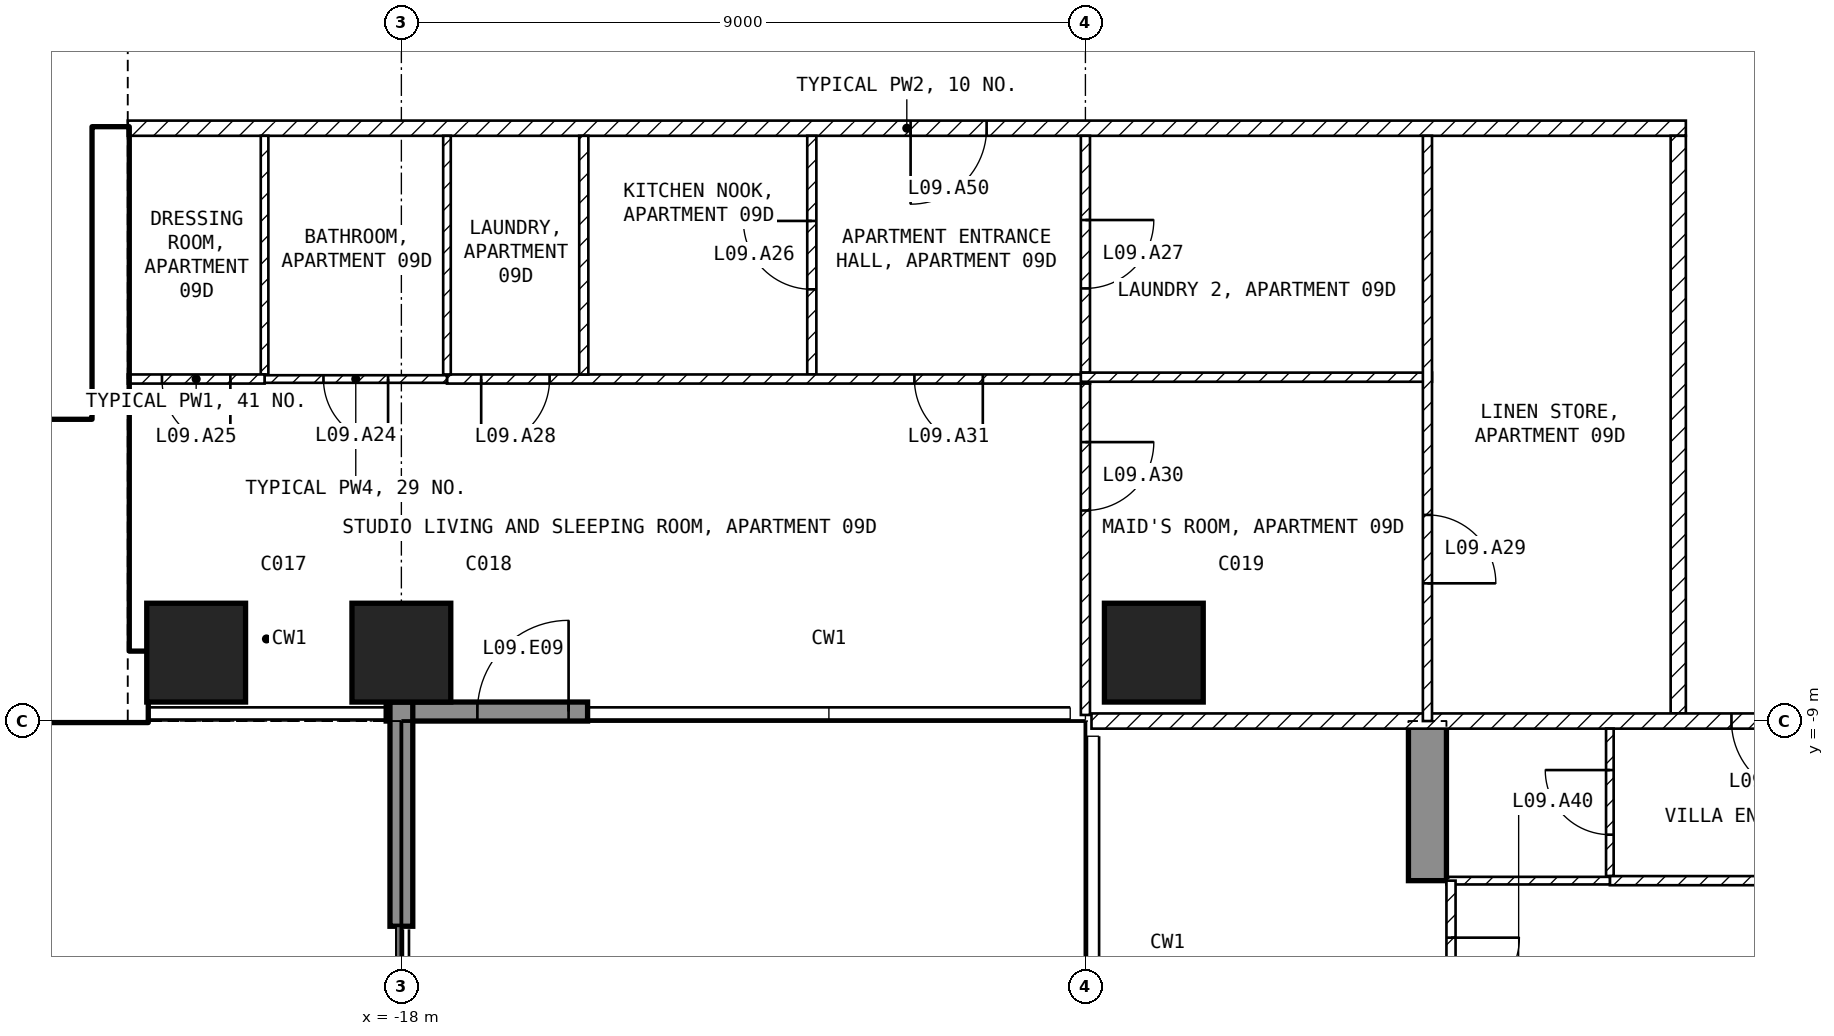
"""IFC4 building model, lengths in metres.
Left out: names, types, materials, properties, quantities, classifications, styles, units other than length and angle.
Written with IfcOpenShell. Run it as: python <this file> out.ifc"""

import sys

from ifc_helpers import new_model, si_unit, direction, frame, frame_2d, origin, origin_2d, place, context, subcontext, project, spatial, polyline, rectangle, outline, extrude, element, fill, save


model = new_model("IFC4")
c1 = context("Model", 3, precision=1e-05, world=origin(), true_north=direction((0.0, 1.0)))
c2 = subcontext(c1, "Body", "Model", "MODEL_VIEW")
j1 = project(units=[si_unit("LENGTHUNIT", "METRE"), si_unit("PLANEANGLEUNIT", "RADIAN")], contexts=[c1])
p1 = place(None, origin())
s1 = spatial("IfcSite", under=j1, at=p1, CompositionType="ELEMENT")
p2 = place(p1, origin())
s2 = spatial("IfcBuilding", under=s1, at=p2, CompositionType="ELEMENT")
p3 = place(p2, frame((0.0, 0.0, 50.5)))
s3 = spatial("IfcBuildingStorey", under=s2, at=p3, CompositionType="ELEMENT", Elevation=50.5)
for number, where, z_axis, x_axis in (
    (1, (-20.7, -8.1, -0.25), (0.0, 0.0, 1.0), (1.0, 0.0, 0.0)),
    (2, (-18.0, -8.1, -0.25), (0.0, 0.0, 1.0), (1.0, 0.0, 0.0)),
    (3, (-8.1, -8.1, -0.25), (0.0, 0.0, 1.0), (1.0, 0.0, 0.0)),
):
    element("IfcColumn", number, at=place(p3, frame(where, z_axis=z_axis, x_axis=x_axis)), inside=s3, PredefinedType="COLUMN", context=c2, shape_type="SweptSolid", body=[
        extrude(rectangle(XDim=1.3, YDim=1.3, at=origin_2d()), origin(), (0.0, 0.0, 1.0), 3.5),
    ])
p4 = place(p3, frame((-4.75, -25.45, -0.25), z_axis=(1.0, 0.0, 0.0), x_axis=(0.0, 1.0, 0.0)))
e4 = element("IfcWall", 4, at=p4, inside=s3, PredefinedType="SHEAR", context=c2, shape_type="SweptSolid", body=[
    extrude(outline(polyline([(0.0, 0.0), (4.15, 0.0), (4.15, 2.65), (6.55, 2.65), (6.55, 0.0), (11.95, 0.0), (11.95, 2.65), (14.35, 2.65), (14.35, 0.0), (16.45, 0.0), (16.45, 3.5), (0.0, 3.5), (0.0, 0.0)])), origin(), (0.0, 0.0, 1.0), 0.5),
])
p5 = place(p3, frame((-18.2, -8.875, 0.0), z_axis=(0.0, 0.0, 1.0), x_axis=(1.0, 0.0, 0.0)))
e5 = element("IfcWall", 5, at=p5, inside=s3, PredefinedType="SOLIDWALL", context=c2, shape_type="SweptSolid", body=[
    extrude(rectangle(XDim=2.65, YDim=0.25, at=frame_2d((1.325, 0.0))), origin(), (0.0, 0.0, 1.0), 3.25),
])
p6 = place(p5, frame((1.2, 0.0, 0.0)))
e6 = element("IfcOpeningElement", 6, at=p6, cuts=e5, PredefinedType="OPENING", context=c2, shape_type="SweptSolid", body=[
    extrude(rectangle(XDim=1.2, YDim=2.4, at=frame_2d((0.6, 1.2))), frame((0.0, 0.135, 0.0), z_axis=(0.0, -1.0, 0.0), x_axis=(1.0, 0.0, 0.0)), (0.0, 0.0, 1.0), 0.27),
])
p7 = place(p3, frame((-18.0, -8.75, 0.0), z_axis=(0.0, 0.0, 1.0), x_axis=(0.0, -1.0, 0.0)))
e7 = element("IfcWall", 7, at=p7, inside=s3, PredefinedType="SOLIDWALL", context=c2, shape_type="SweptSolid", body=[
    extrude(rectangle(XDim=2.95, YDim=0.3, at=frame_2d((1.475, 0.0))), origin(), (0.0, 0.0, 1.0), 3.25),
])
p8 = place(p3, frame((-32.4, -8.55, 0.0), z_axis=(0.0, 0.0, 1.0), x_axis=(1.0, 0.0, 0.0)))
e8 = element("IfcWall", 8, at=p8, inside=s3, PredefinedType="SHEAR", context=c2, shape_type="SweptSolid", body=[
    extrude(rectangle(XDim=11.05, YDim=0.9, at=frame_2d((5.525, 0.0))), origin(), (0.0, 0.0, 1.0), 3.25),
])
p9 = place(p3, frame((-21.825, -8.1, 0.0), z_axis=(0.0, 0.0, 1.0), x_axis=(0.0, 1.0, 0.0)))
e9 = element("IfcWall", 9, at=p9, inside=s3, PredefinedType="SHEAR", context=c2, shape_type="SweptSolid", body=[
    extrude(rectangle(XDim=6.9, YDim=0.45, at=frame_2d((3.45, 0.0))), origin(), (0.0, 0.0, 1.0), 3.25),
])
p10 = place(p3, frame((-28.35, -5.15, 0.0), z_axis=(0.0, 0.0, 1.0), x_axis=(1.0, 0.0, 0.0)))
e10 = element("IfcWall", 10, at=p10, inside=s3, PredefinedType="SOLIDWALL", context=c2, shape_type="SweptSolid", body=[
    extrude(rectangle(XDim=6.3, YDim=0.2, at=frame_2d((3.15, 0.0))), origin(), (0.0, 0.0, 1.0), 3.25),
])
p11 = place(p10, frame((5.1, 0.0, 0.0)))
e11 = element("IfcOpeningElement", 11, at=p11, cuts=e10, PredefinedType="OPENING", context=c2, shape_type="SweptSolid", body=[
    extrude(rectangle(XDim=1.0, YDim=2.1, at=frame_2d((0.5, 1.05))), frame((0.0, 0.11, 0.0), z_axis=(0.0, -1.0, 0.0), x_axis=(1.0, 0.0, 0.0)), (0.0, 0.0, 1.0), 0.22),
])
p12 = place(p3, frame((-1.1, -1.2, 0.0), z_axis=(0.0, 0.0, 1.0), x_axis=(-1.0, 0.0, 0.0)))
e12 = element("IfcWall", 12, at=p12, inside=s3, PredefinedType="PARTITIONING", context=c2, shape_type="SweptSolid", body=[
    extrude(rectangle(XDim=20.5, YDim=0.2, at=frame_2d((10.25, 0.0))), origin(), (0.0, 0.0, 1.0), 3.25),
])
p13 = place(p12, frame((9.2, 0.0, 0.0)))
e13 = element("IfcOpeningElement", 13, at=p13, cuts=e12, PredefinedType="OPENING", context=c2, shape_type="SweptSolid", body=[
    extrude(rectangle(XDim=1.0, YDim=2.1, at=frame_2d((0.5, 1.05))), frame((0.0, 0.11, 0.0), z_axis=(0.0, -1.0, 0.0), x_axis=(1.0, 0.0, 0.0)), (0.0, 0.0, 1.0), 0.22),
])
p14 = place(p3, frame((-1.2, -8.9, 0.0), z_axis=(0.0, 0.0, 1.0), x_axis=(0.0, 1.0, 0.0)))
e14 = element("IfcWall", 14, at=p14, inside=s3, PredefinedType="PARTITIONING", context=c2, shape_type="SweptSolid", body=[
    extrude(rectangle(XDim=7.6, YDim=0.2, at=frame_2d((3.8, 0.0))), origin(), (0.0, 0.0, 1.0), 3.25),
])
p15 = place(p3, frame((8.92, -9.0, 0.0), z_axis=(0.0, 0.0, 1.0), x_axis=(-1.0, 0.0, 0.0)))
e15 = element("IfcWall", 15, at=p15, inside=s3, PredefinedType="PARTITIONING", context=c2, shape_type="SweptSolid", body=[
    extrude(rectangle(XDim=17.84, YDim=0.2, at=frame_2d((8.92, 0.0))), origin(), (0.0, 0.0, 1.0), 3.25),
])
p16 = place(p15, frame((8.42, 0.0, 0.0)))
e16 = element("IfcOpeningElement", 16, at=p16, cuts=e15, PredefinedType="OPENING", context=c2, shape_type="SweptSolid", body=[
    extrude(rectangle(XDim=1.0, YDim=2.1, at=frame_2d((0.5, 1.05))), frame((0.0, 0.11, 0.0), z_axis=(0.0, -1.0, 0.0), x_axis=(1.0, 0.0, 0.0)), (0.0, 0.0, 1.0), 0.22),
])
p17 = place(p3, frame((-12.6, -4.44, 0.0), z_axis=(0.0, 0.0, 1.0), x_axis=(0.0, 1.0, 0.0)))
e17 = element("IfcWall", 17, at=p17, inside=s3, PredefinedType="PARTITIONING", context=c2, shape_type="SweptSolid", body=[
    extrude(rectangle(XDim=3.14, YDim=0.12, at=frame_2d((1.57, 0.0))), origin(), (0.0, 0.0, 1.0), 3.25),
])
p18 = place(p17, frame((1.12, 0.0, 0.0)))
e18 = element("IfcOpeningElement", 18, at=p18, cuts=e17, PredefinedType="OPENING", context=c2, shape_type="SweptSolid", body=[
    extrude(rectangle(XDim=0.9, YDim=2.1, at=frame_2d((0.45, 1.05))), frame((0.0, 0.07, 0.0), z_axis=(0.0, -1.0, 0.0), x_axis=(1.0, 0.0, 0.0)), (0.0, 0.0, 1.0), 0.14),
])
p19 = place(p3, frame((-8.94, -4.5, 0.0), z_axis=(0.0, 0.0, 1.0), x_axis=(-1.0, 0.0, 0.0)))
e19 = element("IfcWall", 19, at=p19, inside=s3, PredefinedType="PARTITIONING", context=c2, shape_type="SweptSolid", body=[
    extrude(rectangle(XDim=8.46, YDim=0.12, at=frame_2d((4.23, 0.0))), origin(), (0.0, 0.0, 1.0), 3.25),
])
p20 = place(p19, frame((7.11, 0.0, 0.0)))
e20 = element("IfcOpeningElement", 20, at=p20, cuts=e19, PredefinedType="OPENING", context=c2, shape_type="SweptSolid", body=[
    extrude(rectangle(XDim=0.9, YDim=2.1, at=frame_2d((0.45, 1.05))), frame((0.0, 0.07, 0.0), z_axis=(0.0, -1.0, 0.0), x_axis=(1.0, 0.0, 0.0)), (0.0, 0.0, 1.0), 0.14),
])
p21 = place(p19, frame((1.41, 0.0, 0.0)))
e21 = element("IfcOpeningElement", 21, at=p21, cuts=e19, PredefinedType="OPENING", context=c2, shape_type="SweptSolid", body=[
    extrude(rectangle(XDim=0.9, YDim=2.1, at=frame_2d((0.45, 1.05))), frame((0.0, 0.07, 0.0), z_axis=(0.0, -1.0, 0.0), x_axis=(1.0, 0.0, 0.0)), (0.0, 0.0, 1.0), 0.14),
])
p22 = place(p3, frame((-9.0, -1.3, 0.0), z_axis=(0.0, 0.0, 1.0), x_axis=(0.0, -1.0, 0.0)))
e22 = element("IfcWall", 22, at=p22, inside=s3, PredefinedType="PARTITIONING", context=c2, shape_type="SweptSolid", body=[
    extrude(rectangle(XDim=3.116, YDim=0.12, at=frame_2d((1.558, 0.0))), origin(), (0.0, 0.0, 1.0), 3.25),
])
p23 = place(p22, frame((1.108, 0.0, 0.0)))
e23 = element("IfcOpeningElement", 23, at=p23, cuts=e22, PredefinedType="OPENING", context=c2, shape_type="SweptSolid", body=[
    extrude(rectangle(XDim=0.9, YDim=2.1, at=frame_2d((0.45, 1.05))), frame((0.0, 0.07, 0.0), z_axis=(0.0, -1.0, 0.0), x_axis=(1.0, 0.0, 0.0)), (0.0, 0.0, 1.0), 0.14),
])
p24 = place(p3, frame((-15.6, -4.44, 0.0), z_axis=(0.0, 0.0, 1.0), x_axis=(0.0, 1.0, 0.0)))
e24 = element("IfcWall", 24, at=p24, inside=s3, PredefinedType="PARTITIONING", context=c2, shape_type="SweptSolid", body=[
    extrude(rectangle(XDim=3.14, YDim=0.12, at=frame_2d((1.57, 0.0))), origin(), (0.0, 0.0, 1.0), 3.25),
])
for number, where, z_axis, x_axis in (
    (25, (-17.4, -4.44, 0.0), (0.0, 0.0, 1.0), (0.0, 1.0, 0.0)),
    (26, (-19.8, -4.44, 0.0), (0.0, 0.0, 1.0), (0.0, 1.0, 0.0)),
):
    element("IfcWall", number, at=place(p3, frame(where, z_axis=z_axis, x_axis=x_axis)), inside=s3, PredefinedType="PARTITIONING", context=c2, shape_type="SweptSolid", body=[
        extrude(rectangle(XDim=3.14, YDim=0.1, at=frame_2d((1.57, 0.0))), origin(), (0.0, 0.0, 1.0), 3.25),
    ])
p25 = place(p3, frame((-17.4, -4.5, 0.0), z_axis=(0.0, 0.0, 1.0), x_axis=(-1.0, 0.0, 0.0)))
e27 = element("IfcWall", 27, at=p25, inside=s3, PredefinedType="PARTITIONING", context=c2, shape_type="SweptSolid", body=[
    extrude(rectangle(XDim=2.4, YDim=0.1, at=frame_2d((1.2, 0.0))), origin(), (0.0, 0.0, 1.0), 3.25),
])
p26 = place(p25, frame((0.775, 0.0, 0.0)))
e28 = element("IfcOpeningElement", 28, at=p26, cuts=e27, PredefinedType="OPENING", context=c2, shape_type="SweptSolid", body=[
    extrude(rectangle(XDim=0.85, YDim=2.1, at=frame_2d((0.425, 1.05))), frame((0.0, 0.06, 0.0), z_axis=(0.0, -1.0, 0.0), x_axis=(1.0, 0.0, 0.0)), (0.0, 0.0, 1.0), 0.12),
])
p27 = place(p3, frame((-19.8, -4.5, 0.0), z_axis=(0.0, 0.0, 1.0), x_axis=(-1.0, 0.0, 0.0)))
e29 = element("IfcWall", 29, at=p27, inside=s3, PredefinedType="PARTITIONING", context=c2, shape_type="SweptSolid", body=[
    extrude(rectangle(XDim=1.8, YDim=0.12, at=frame_2d((0.9, 0.0))), origin(), (0.0, 0.0, 1.0), 3.25),
])
p28 = place(p27, frame((0.45, 0.0, 0.0)))
e30 = element("IfcOpeningElement", 30, at=p28, cuts=e29, PredefinedType="OPENING", context=c2, shape_type="SweptSolid", body=[
    extrude(rectangle(XDim=0.9, YDim=2.1, at=frame_2d((0.45, 1.05))), frame((0.0, 0.07, 0.0), z_axis=(0.0, -1.0, 0.0), x_axis=(1.0, 0.0, 0.0)), (0.0, 0.0, 1.0), 0.14),
])
p29 = place(p3, frame((-9.0, -4.56, 0.0), z_axis=(0.0, 0.0, 1.0), x_axis=(0.0, -1.0, 0.0)))
e31 = element("IfcWall", 31, at=p29, inside=s3, PredefinedType="PARTITIONING", context=c2, shape_type="SweptSolid", body=[
    extrude(rectangle(XDim=4.36, YDim=0.12, at=frame_2d((2.18, 0.0))), origin(), (0.0, 0.0, 1.0), 3.25),
])
p30 = place(p29, frame((0.77, 0.0, 0.0)))
e32 = element("IfcOpeningElement", 32, at=p30, cuts=e31, PredefinedType="OPENING", context=c2, shape_type="SweptSolid", body=[
    extrude(rectangle(XDim=0.9, YDim=2.1, at=frame_2d((0.45, 1.05))), frame((0.0, 0.07, 0.0), z_axis=(0.0, -1.0, 0.0), x_axis=(1.0, 0.0, 0.0)), (0.0, 0.0, 1.0), 0.14),
])
p31 = place(p3, frame((-4.44, -4.476, 0.0), z_axis=(0.0, 0.0, 1.0), x_axis=(-1.0, 0.0, 0.0)))
e33 = element("IfcWall", 33, at=p31, inside=s3, PredefinedType="PARTITIONING", context=c2, shape_type="SweptSolid", body=[
    extrude(rectangle(XDim=4.62, YDim=0.12, at=frame_2d((2.31, 0.0))), origin(), (0.0, 0.0, 1.0), 3.25),
])
p32 = place(p3, frame((-4.5, -1.3, 0.0), z_axis=(0.0, 0.0, 1.0), x_axis=(0.0, -1.0, 0.0)))
e34 = element("IfcWall", 34, at=p32, inside=s3, PredefinedType="PARTITIONING", context=c2, shape_type="SweptSolid", body=[
    extrude(rectangle(XDim=7.7, YDim=0.12, at=frame_2d((3.85, 0.0))), origin(), (0.0, 0.0, 1.0), 3.25),
])
p33 = place(p32, frame((4.988, 0.0, 0.0)))
e35 = element("IfcOpeningElement", 35, at=p33, cuts=e34, PredefinedType="OPENING", context=c2, shape_type="SweptSolid", body=[
    extrude(rectangle(XDim=0.9, YDim=2.1, at=frame_2d((0.45, 1.05))), frame((0.0, 0.07, 0.0), z_axis=(0.0, -1.0, 0.0), x_axis=(1.0, 0.0, 0.0)), (0.0, 0.0, 1.0), 0.14),
])
p34 = place(p3, frame((-2.1, -11.04, 0.0), z_axis=(0.0, 0.0, 1.0), x_axis=(0.0, 1.0, 0.0)))
e36 = element("IfcWall", 36, at=p34, inside=s3, PredefinedType="PARTITIONING", context=c2, shape_type="SweptSolid", body=[
    extrude(rectangle(XDim=1.94, YDim=0.1, at=frame_2d((0.97, 0.0))), origin(), (0.0, 0.0, 1.0), 3.25),
])
p35 = place(p34, frame((0.545, 0.0, 0.0)))
e37 = element("IfcOpeningElement", 37, at=p35, cuts=e36, PredefinedType="OPENING", context=c2, shape_type="SweptSolid", body=[
    extrude(rectangle(XDim=0.85, YDim=2.1, at=frame_2d((0.425, 1.05))), frame((0.0, 0.06, 0.0), z_axis=(0.0, -1.0, 0.0), x_axis=(1.0, 0.0, 0.0)), (0.0, 0.0, 1.0), 0.12),
])
p36 = place(p3, frame((4.25, -11.1, 0.0), z_axis=(0.0, 0.0, 1.0), x_axis=(-1.0, 0.0, 0.0)))
e38 = element("IfcWall", 38, at=p36, inside=s3, PredefinedType="PARTITIONING", context=c2, shape_type="SweptSolid", body=[
    extrude(rectangle(XDim=6.35, YDim=0.12, at=frame_2d((3.175, 0.0))), origin(), (0.0, 0.0, 1.0), 3.25),
])
p37 = place(p36, frame((2.725, 0.0, 0.0)))
e39 = element("IfcOpeningElement", 39, at=p37, cuts=e38, PredefinedType="OPENING", context=c2, shape_type="SweptSolid", body=[
    extrude(rectangle(XDim=0.9, YDim=2.1, at=frame_2d((0.45, 1.05))), frame((0.0, 0.07, 0.0), z_axis=(0.0, -1.0, 0.0), x_axis=(1.0, 0.0, 0.0)), (0.0, 0.0, 1.0), 0.14),
])
p38 = place(p3, frame((-2.1, -11.1, 0.0), z_axis=(0.0, 0.0, 1.0), x_axis=(-1.0, 0.0, 0.0)))
e40 = element("IfcWall", 40, at=p38, inside=s3, PredefinedType="PARTITIONING", context=c2, shape_type="SweptSolid", body=[
    extrude(rectangle(XDim=2.15, YDim=0.1, at=frame_2d((1.075, 0.0))), origin(), (0.0, 0.0, 1.0), 3.25),
])
p39 = place(p3, frame((-4.19, -11.1, 0.0), z_axis=(0.0, 0.0, 1.0), x_axis=(0.0, -1.0, 0.0)))
e41 = element("IfcWall", 41, at=p39, inside=s3, PredefinedType="PARTITIONING", context=c2, shape_type="SweptSolid", body=[
    extrude(rectangle(XDim=2.4, YDim=0.12, at=frame_2d((1.2, 0.0))), origin(), (0.0, 0.0, 1.0), 2.4),
])
p40 = place(p39, frame((0.75, 0.0, 0.0)))
e42 = element("IfcOpeningElement", 42, at=p40, cuts=e41, PredefinedType="OPENING", context=c2, shape_type="SweptSolid", body=[
    extrude(rectangle(XDim=0.9, YDim=2.1, at=frame_2d((0.45, 1.05))), frame((0.0, 0.07, 0.0), z_axis=(0.0, -1.0, 0.0), x_axis=(1.0, 0.0, 0.0)), (0.0, 0.0, 1.0), 0.14),
])
p41 = place(p6, origin())
e43 = element("IfcDoor", 43, at=p41, inside=s3, OperationType="SINGLE_SWING_RIGHT", PredefinedType="DOOR", context=c2, shape_type="SweptSolid", body=[
    extrude(rectangle(XDim=1.2, YDim=2.4, at=frame_2d((0.6, 1.2))), frame((0.0, 0.025, 0.0), z_axis=(0.0, -1.0, 0.0), x_axis=(1.0, 0.0, 0.0)), (0.0, 0.0, 1.0), 0.05),
])
fill(e6, e43)
p42 = place(p11, origin())
e44 = element("IfcDoor", 44, at=p42, inside=s3, OperationType="SINGLE_SWING_LEFT", PredefinedType="DOOR", context=c2, shape_type="SweptSolid", body=[
    extrude(rectangle(XDim=1.0, YDim=2.1, at=frame_2d((0.5, 1.05))), frame((0.0, 0.025, 0.0), z_axis=(0.0, -1.0, 0.0), x_axis=(1.0, 0.0, 0.0)), (0.0, 0.0, 1.0), 0.05),
])
fill(e11, e44)
p43 = place(p26, origin())
e45 = element("IfcDoor", 45, at=p43, inside=s3, OperationType="SINGLE_SWING_LEFT", PredefinedType="DOOR", context=c2, shape_type="SweptSolid", body=[
    extrude(rectangle(XDim=0.85, YDim=2.1, at=frame_2d((0.425, 1.05))), frame((0.0, 0.025, 0.0), z_axis=(0.0, -1.0, 0.0), x_axis=(1.0, 0.0, 0.0)), (0.0, 0.0, 1.0), 0.05),
])
fill(e28, e45)
p44 = place(p28, origin())
e46 = element("IfcDoor", 46, at=p44, inside=s3, OperationType="SINGLE_SWING_LEFT", PredefinedType="DOOR", context=c2, shape_type="SweptSolid", body=[
    extrude(rectangle(XDim=0.9, YDim=2.1, at=frame_2d((0.45, 1.05))), frame((0.0, 0.025, 0.0), z_axis=(0.0, -1.0, 0.0), x_axis=(1.0, 0.0, 0.0)), (0.0, 0.0, 1.0), 0.05),
])
fill(e30, e46)
p45 = place(p18, origin())
e47 = element("IfcDoor", 47, at=p45, inside=s3, OperationType="SINGLE_SWING_RIGHT", PredefinedType="DOOR", context=c2, shape_type="SweptSolid", body=[
    extrude(rectangle(XDim=0.9, YDim=2.1, at=frame_2d((0.45, 1.05))), frame((0.0, 0.025, 0.0), z_axis=(0.0, -1.0, 0.0), x_axis=(1.0, 0.0, 0.0)), (0.0, 0.0, 1.0), 0.05),
])
fill(e18, e47)
p46 = place(p23, origin())
e48 = element("IfcDoor", 48, at=p46, inside=s3, OperationType="SINGLE_SWING_LEFT", PredefinedType="DOOR", context=c2, shape_type="SweptSolid", body=[
    extrude(rectangle(XDim=0.9, YDim=2.1, at=frame_2d((0.45, 1.05))), frame((0.0, 0.025, 0.0), z_axis=(0.0, -1.0, 0.0), x_axis=(1.0, 0.0, 0.0)), (0.0, 0.0, 1.0), 0.05),
])
fill(e23, e48)
p47 = place(p20, origin())
e49 = element("IfcDoor", 49, at=p47, inside=s3, OperationType="SINGLE_SWING_RIGHT", PredefinedType="DOOR", context=c2, shape_type="SweptSolid", body=[
    extrude(rectangle(XDim=0.9, YDim=2.1, at=frame_2d((0.45, 1.05))), frame((0.0, 0.025, 0.0), z_axis=(0.0, -1.0, 0.0), x_axis=(1.0, 0.0, 0.0)), (0.0, 0.0, 1.0), 0.05),
])
fill(e20, e49)
p48 = place(p33, origin())
e50 = element("IfcDoor", 50, at=p48, inside=s3, OperationType="SINGLE_SWING_RIGHT", PredefinedType="DOOR", context=c2, shape_type="SweptSolid", body=[
    extrude(rectangle(XDim=0.9, YDim=2.1, at=frame_2d((0.45, 1.05))), frame((0.0, 0.025, 0.0), z_axis=(0.0, -1.0, 0.0), x_axis=(1.0, 0.0, 0.0)), (0.0, 0.0, 1.0), 0.05),
])
fill(e35, e50)
p49 = place(p30, origin())
e51 = element("IfcDoor", 51, at=p49, inside=s3, OperationType="SINGLE_SWING_LEFT", PredefinedType="DOOR", context=c2, shape_type="SweptSolid", body=[
    extrude(rectangle(XDim=0.9, YDim=2.1, at=frame_2d((0.45, 1.05))), frame((0.0, 0.025, 0.0), z_axis=(0.0, -1.0, 0.0), x_axis=(1.0, 0.0, 0.0)), (0.0, 0.0, 1.0), 0.05),
])
fill(e32, e51)
p50 = place(p21, origin())
e52 = element("IfcDoor", 52, at=p50, inside=s3, OperationType="SINGLE_SWING_LEFT", PredefinedType="DOOR", context=c2, shape_type="SweptSolid", body=[
    extrude(rectangle(XDim=0.9, YDim=2.1, at=frame_2d((0.45, 1.05))), frame((0.0, 0.025, 0.0), z_axis=(0.0, -1.0, 0.0), x_axis=(1.0, 0.0, 0.0)), (0.0, 0.0, 1.0), 0.05),
])
fill(e21, e52)
p51 = place(p16, origin())
e53 = element("IfcDoor", 53, at=p51, inside=s3, OperationType="SINGLE_SWING_LEFT", PredefinedType="DOOR", context=c2, shape_type="SweptSolid", body=[
    extrude(rectangle(XDim=1.0, YDim=2.1, at=frame_2d((0.5, 1.05))), frame((0.0, 0.025, 0.0), z_axis=(0.0, -1.0, 0.0), x_axis=(1.0, 0.0, 0.0)), (0.0, 0.0, 1.0), 0.05),
])
fill(e16, e53)
p52 = place(p35, origin())
e54 = element("IfcDoor", 54, at=p52, inside=s3, OperationType="SINGLE_SWING_RIGHT", PredefinedType="DOOR", context=c2, shape_type="SweptSolid", body=[
    extrude(rectangle(XDim=0.85, YDim=2.1, at=frame_2d((0.425, 1.05))), frame((0.0, 0.025, 0.0), z_axis=(0.0, -1.0, 0.0), x_axis=(1.0, 0.0, 0.0)), (0.0, 0.0, 1.0), 0.05),
])
fill(e37, e54)
p53 = place(p13, origin())
e55 = element("IfcDoor", 55, at=p53, inside=s3, OperationType="SINGLE_SWING_RIGHT", PredefinedType="DOOR", context=c2, shape_type="SweptSolid", body=[
    extrude(rectangle(XDim=1.0, YDim=2.1, at=frame_2d((0.5, 1.05))), frame((0.0, 0.025, 0.0), z_axis=(0.0, -1.0, 0.0), x_axis=(1.0, 0.0, 0.0)), (0.0, 0.0, 1.0), 0.05),
])
fill(e13, e55)
p54 = place(p40, origin())
e56 = element("IfcDoor", 56, at=p54, inside=s3, OperationType="SINGLE_SWING_LEFT", PredefinedType="DOOR", context=c2, shape_type="SweptSolid", body=[
    extrude(rectangle(XDim=0.9, YDim=2.1, at=frame_2d((0.45, 1.05))), frame((0.0, 0.025, 0.0), z_axis=(0.0, -1.0, 0.0), x_axis=(1.0, 0.0, 0.0)), (0.0, 0.0, 1.0), 0.05),
])
fill(e42, e56)
save(model, sys.argv[1])
